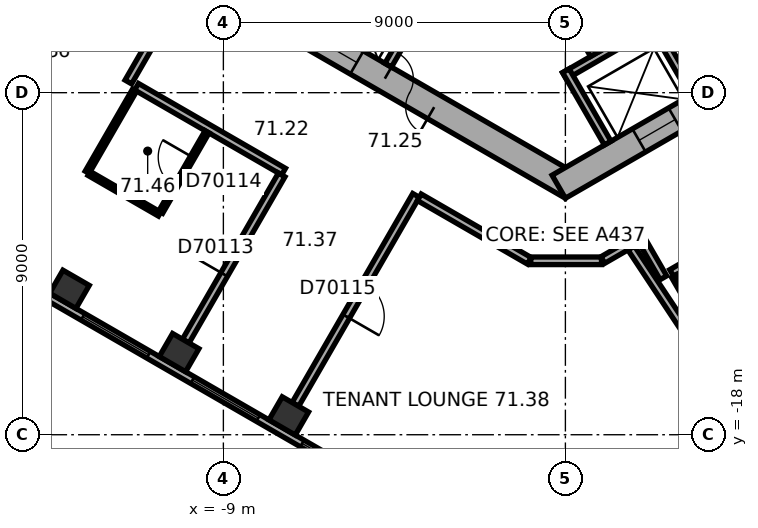
"""IFC4 building model, lengths in metres.
Left out: names, types, materials, properties, quantities, classifications, styles, units other than length and angle.
Written with IfcOpenShell. Run it as: python <this file> out.ifc"""

import sys

from ifc_helpers import new_model, si_unit, direction, frame, frame_2d, origin, origin_2d, place, context, subcontext, project, spatial, rectangle, extrude, element, fill, save


model = new_model("IFC4")
c1 = context("Model", 3, precision=1e-05, world=origin(), true_north=direction((0.0, 1.0)))
c2 = subcontext(c1, "Body", "Model", "MODEL_VIEW")
j1 = project(units=[si_unit("LENGTHUNIT", "METRE"), si_unit("PLANEANGLEUNIT", "RADIAN")], contexts=[c1])
p1 = place(None, origin())
s1 = spatial("IfcSite", under=j1, at=p1, CompositionType="ELEMENT")
p2 = place(p1, origin())
s2 = spatial("IfcBuilding", under=s1, at=p2, CompositionType="ELEMENT")
p3 = place(p2, frame((0.0, 0.0, 289.4)))
s3 = spatial("IfcBuildingStorey", under=s2, at=p3, CompositionType="ELEMENT", Elevation=289.4)
for number, where, z_axis, x_axis in (
    (1, (-13.05, -14.174, 0.0), (0.0, 0.0, 1.0), (0.866, -0.5, 0.0)),
    (2, (-10.165, -15.84, 0.0), (0.0, 0.0, 1.0), (0.866, -0.5, 0.0)),
    (3, (-7.28, -17.505, 0.0), (0.0, 0.0, 1.0), (0.866, -0.5, 0.0)),
):
    element("IfcColumn", number, at=place(p3, frame(where, z_axis=z_axis, x_axis=x_axis)), inside=s3, PredefinedType="COLUMN", context=c2, shape_type="SweptSolid", body=[
        extrude(rectangle(XDim=0.8, YDim=0.7, at=origin_2d()), origin(), (0.0, 0.0, 1.0), 3.7),
    ])
p4 = place(p3, frame((-10.025, -5.586, 0.0), z_axis=(0.0, 0.0, 1.0), x_axis=(0.866026453023, -0.499998182661, 0.0)))
e4 = element("IfcWall", 4, at=p4, inside=s3, PredefinedType="SHEAR", context=c2, shape_type="SweptSolid", body=[
    extrude(rectangle(XDim=11.778, YDim=0.7, at=frame_2d((5.889, 0.0))), origin(), (0.0, 0.0, 1.0), 3.7),
])
p5 = place(p4, frame((6.089, 0.0, 0.0)))
e5 = element("IfcOpeningElement", 5, at=p5, cuts=e4, PredefinedType="OPENING", context=c2, shape_type="SweptSolid", body=[
    extrude(rectangle(XDim=1.5, YDim=2.1, at=frame_2d((0.75, 1.05))), frame((0.0, 0.36, 0.0), z_axis=(0.0, -1.0, 0.0), x_axis=(1.0, 0.0, 0.0)), (0.0, 0.0, 1.0), 0.72),
])
p6 = place(p4, frame((1.539, 0.0, 0.0)))
e6 = element("IfcOpeningElement", 6, at=p6, cuts=e4, PredefinedType="OPENING", context=c2, shape_type="SweptSolid", body=[
    extrude(rectangle(XDim=1.1, YDim=2.1, at=frame_2d((0.55, 1.05))), frame((0.0, 0.36, 0.0), z_axis=(0.0, -1.0, 0.0), x_axis=(1.0, 0.0, 0.0)), (0.0, 0.0, 1.0), 0.72),
])
p7 = place(p4, frame((4.139, 0.0, 0.0)))
e7 = element("IfcOpeningElement", 7, at=p7, cuts=e4, PredefinedType="OPENING", context=c2, shape_type="SweptSolid", body=[
    extrude(rectangle(XDim=1.1, YDim=2.1, at=frame_2d((0.55, 1.05))), frame((0.0, 0.36, 0.0), z_axis=(0.0, -1.0, 0.0), x_axis=(1.0, 0.0, 0.0)), (0.0, 0.0, 1.0), 0.72),
])
p8 = place(p3, frame((-0.175, -11.475, 0.0), z_axis=(0.0, 0.0, 1.0), x_axis=(0.866026453023, 0.499998182661, 0.0)))
e8 = element("IfcWall", 8, at=p8, inside=s3, PredefinedType="SHEAR", context=c2, shape_type="SweptSolid", body=[
    extrude(rectangle(XDim=11.778, YDim=0.7, at=frame_2d((5.889, 0.0))), origin(), (0.0, 0.0, 1.0), 3.7),
])
p9 = place(p8, frame((2.439, 0.0, 0.0)))
e9 = element("IfcOpeningElement", 9, at=p9, cuts=e8, PredefinedType="OPENING", context=c2, shape_type="SweptSolid", body=[
    extrude(rectangle(XDim=1.1, YDim=2.1, at=frame_2d((0.55, 1.05))), frame((0.0, 0.36, 0.0), z_axis=(0.0, -1.0, 0.0), x_axis=(1.0, 0.0, 0.0)), (0.0, 0.0, 1.0), 0.72),
])
p10 = place(p8, frame((5.039, 0.0, 0.0)))
e10 = element("IfcOpeningElement", 10, at=p10, cuts=e8, PredefinedType="OPENING", context=c2, shape_type="SweptSolid", body=[
    extrude(rectangle(XDim=1.1, YDim=2.1, at=frame_2d((0.55, 1.05))), frame((0.0, 0.36, 0.0), z_axis=(0.0, -1.0, 0.0), x_axis=(1.0, 0.0, 0.0)), (0.0, 0.0, 1.0), 0.72),
])
p11 = place(p8, frame((7.639, 0.0, 0.0)))
e11 = element("IfcOpeningElement", 11, at=p11, cuts=e8, PredefinedType="OPENING", context=c2, shape_type="SweptSolid", body=[
    extrude(rectangle(XDim=1.1, YDim=2.1, at=frame_2d((0.55, 1.05))), frame((0.0, 0.36, 0.0), z_axis=(0.0, -1.0, 0.0), x_axis=(1.0, 0.0, 0.0)), (0.0, 0.0, 1.0), 0.72),
])
p12 = place(p3, frame((-16.626, -12.629, 0.0), z_axis=(0.0, 0.0, 1.0), x_axis=(0.866026460444, -0.499998169808, 0.0)))
e12 = element("IfcWall", 12, at=p12, inside=s3, PredefinedType="STANDARD", context=c2, shape_type="SweptSolid", body=[
    extrude(rectangle(XDim=17.731, YDim=0.2, at=frame_2d((8.866, 0.0))), origin(), (0.0, 0.0, 1.0), 3.7),
])
p13 = place(p12, frame((1.203, 0.0, 0.9)))
e13 = element("IfcOpeningElement", 13, at=p13, cuts=e12, PredefinedType="OPENING", context=c2, shape_type="SweptSolid", body=[
    extrude(rectangle(XDim=2.0, YDim=2.0, at=frame_2d((1.0, 1.0))), frame((0.0, 0.11, 0.0), z_axis=(0.0, -1.0, 0.0), x_axis=(1.0, 0.0, 0.0)), (0.0, 0.0, 1.0), 0.22),
])
p14 = place(p12, frame((4.535, 0.0, 0.9)))
e14 = element("IfcOpeningElement", 14, at=p14, cuts=e12, PredefinedType="OPENING", context=c2, shape_type="SweptSolid", body=[
    extrude(rectangle(XDim=2.0, YDim=2.0, at=frame_2d((1.0, 1.0))), frame((0.0, 0.11, 0.0), z_axis=(0.0, -1.0, 0.0), x_axis=(1.0, 0.0, 0.0)), (0.0, 0.0, 1.0), 0.22),
])
p15 = place(p12, frame((7.867, 0.0, 0.9)))
e15 = element("IfcOpeningElement", 15, at=p15, cuts=e12, PredefinedType="OPENING", context=c2, shape_type="SweptSolid", body=[
    extrude(rectangle(XDim=2.0, YDim=2.0, at=frame_2d((1.0, 1.0))), frame((0.0, 0.11, 0.0), z_axis=(0.0, -1.0, 0.0), x_axis=(1.0, 0.0, 0.0)), (0.0, 0.0, 1.0), 0.22),
])
p16 = place(p12, frame((11.198, 0.0, 0.9)))
e16 = element("IfcOpeningElement", 16, at=p16, cuts=e12, PredefinedType="OPENING", context=c2, shape_type="SweptSolid", body=[
    extrude(rectangle(XDim=2.0, YDim=2.0, at=frame_2d((1.0, 1.0))), frame((0.0, 0.11, 0.0), z_axis=(0.0, -1.0, 0.0), x_axis=(1.0, 0.0, 0.0)), (0.0, 0.0, 1.0), 0.22),
])
p17 = place(p12, frame((14.53, 0.0, 0.9)))
e17 = element("IfcOpeningElement", 17, at=p17, cuts=e12, PredefinedType="OPENING", context=c2, shape_type="SweptSolid", body=[
    extrude(rectangle(XDim=2.0, YDim=2.0, at=frame_2d((1.0, 1.0))), frame((0.0, 0.11, 0.0), z_axis=(0.0, -1.0, 0.0), x_axis=(1.0, 0.0, 0.0)), (0.0, 0.0, 1.0), 0.22),
])
p18 = place(p3, frame((2.58, -21.377, 0.0), z_axis=(0.0, 0.0, 1.0), x_axis=(0.833888592176, 0.551932800112, 0.0)))
e18 = element("IfcWall", 18, at=p18, inside=s3, PredefinedType="STANDARD", context=c2, shape_type="SweptSolid", body=[
    extrude(rectangle(XDim=17.731, YDim=0.2, at=frame_2d((8.866, 0.0))), origin(), (0.0, 0.0, 1.0), 3.7),
])
p19 = place(p18, frame((1.202, 0.0, 0.9)))
e19 = element("IfcOpeningElement", 19, at=p19, cuts=e18, PredefinedType="OPENING", context=c2, shape_type="SweptSolid", body=[
    extrude(rectangle(XDim=2.0, YDim=2.0, at=frame_2d((1.0, 1.0))), frame((0.0, 0.11, 0.0), z_axis=(0.0, -1.0, 0.0), x_axis=(1.0, 0.0, 0.0)), (0.0, 0.0, 1.0), 0.22),
])
p20 = place(p18, frame((4.533, 0.0, 0.9)))
e20 = element("IfcOpeningElement", 20, at=p20, cuts=e18, PredefinedType="OPENING", context=c2, shape_type="SweptSolid", body=[
    extrude(rectangle(XDim=2.0, YDim=2.0, at=frame_2d((1.0, 1.0))), frame((0.0, 0.11, 0.0), z_axis=(0.0, -1.0, 0.0), x_axis=(1.0, 0.0, 0.0)), (0.0, 0.0, 1.0), 0.22),
])
p21 = place(p18, frame((7.865, 0.0, 0.9)))
e21 = element("IfcOpeningElement", 21, at=p21, cuts=e18, PredefinedType="OPENING", context=c2, shape_type="SweptSolid", body=[
    extrude(rectangle(XDim=2.0, YDim=2.0, at=frame_2d((1.0, 1.0))), frame((0.0, 0.11, 0.0), z_axis=(0.0, -1.0, 0.0), x_axis=(1.0, 0.0, 0.0)), (0.0, 0.0, 1.0), 0.22),
])
p22 = place(p18, frame((11.197, 0.0, 0.9)))
e22 = element("IfcOpeningElement", 22, at=p22, cuts=e18, PredefinedType="OPENING", context=c2, shape_type="SweptSolid", body=[
    extrude(rectangle(XDim=2.0, YDim=2.0, at=frame_2d((1.0, 1.0))), frame((0.0, 0.11, 0.0), z_axis=(0.0, -1.0, 0.0), x_axis=(1.0, 0.0, 0.0)), (0.0, 0.0, 1.0), 0.22),
])
p23 = place(p18, frame((14.528, 0.0, 0.9)))
e23 = element("IfcOpeningElement", 23, at=p23, cuts=e18, PredefinedType="OPENING", context=c2, shape_type="SweptSolid", body=[
    extrude(rectangle(XDim=2.0, YDim=2.0, at=frame_2d((1.0, 1.0))), frame((0.0, 0.11, 0.0), z_axis=(0.0, -1.0, 0.0), x_axis=(1.0, 0.0, 0.0)), (0.0, 0.0, 1.0), 0.22),
])
p24 = place(p3, frame((-3.563, -6.372, 0.0), z_axis=(0.0, 0.0, 1.0), x_axis=(-0.499994660107, -0.866028486751, 0.0)))
e24 = element("IfcWall", 24, at=p24, inside=s3, PredefinedType="PARTITIONING", context=c2, shape_type="SweptSolid", body=[
    extrude(rectangle(XDim=2.2, YDim=0.2, at=frame_2d((1.1, 0.0))), origin(), (0.0, 0.0, 1.0), 3.42),
])
p25 = place(p3, frame((-0.024, -8.559, 0.0), z_axis=(0.0, 0.0, 1.0), x_axis=(0.866026010844, 0.49999894854, 0.0)))
e25 = element("IfcWall", 25, at=p25, inside=s3, PredefinedType="PARTITIONING", context=c2, shape_type="SweptSolid", body=[
    extrude(rectangle(XDim=8.0, YDim=0.2, at=frame_2d((4.0, 0.0))), origin(), (0.0, 0.0, 1.0), 3.42),
])
for number, where, z_axis, x_axis in (
    (26, (0.013, -8.422, 0.0), (0.0, 0.0, 1.0), (0.5, -0.866, 0.0)),
    (27, (2.264, -7.122, 0.0), (0.0, 0.0, 1.0), (0.5, -0.866, 0.0)),
):
    element("IfcWall", number, at=place(p3, frame(where, z_axis=z_axis, x_axis=x_axis)), inside=s3, PredefinedType="PARTITIONING", context=c2, shape_type="SweptSolid", body=[
        extrude(rectangle(XDim=2.2, YDim=0.2, at=frame_2d((1.1, 0.0))), origin(), (0.0, 0.0, 1.0), 3.42),
    ])
p26 = place(p3, frame((-1.558, -3.902, 0.0), z_axis=(0.0, 0.0, 1.0), x_axis=(0.499977259774, -0.866038532462, 0.0)))
e28 = element("IfcWall", 28, at=p26, inside=s3, PredefinedType="SHEAR", context=c2, shape_type="SweptSolid", body=[
    extrude(rectangle(XDim=4.7, YDim=0.3, at=frame_2d((2.35, 0.0))), origin(), (0.0, 0.0, 1.0), 3.42),
])
p27 = place(p26, frame((0.8, 0.0, 0.0)))
e29 = element("IfcOpeningElement", 29, at=p27, cuts=e28, PredefinedType="OPENING", context=c2, shape_type="SweptSolid", body=[
    extrude(rectangle(XDim=1.2, YDim=2.1, at=frame_2d((0.6, 1.05))), frame((0.0, 0.16, 0.0), z_axis=(0.0, -1.0, 0.0), x_axis=(1.0, 0.0, 0.0)), (0.0, 0.0, 1.0), 0.32),
])
p28 = place(p3, frame((-12.585, -11.095, 0.0), z_axis=(0.0, 0.0, 1.0), x_axis=(0.500004234368, 0.866022959057, 0.0)))
e30 = element("IfcWall", 30, at=p28, inside=s3, PredefinedType="PARTITIONING", context=c2, shape_type="SweptSolid", body=[
    extrude(rectangle(XDim=2.5, YDim=0.12, at=frame_2d((1.25, 0.0))), origin(), (0.0, 0.0, 1.0), 3.42),
])
p29 = place(p3, frame((-11.285, -8.844, 0.0), z_axis=(0.0, 0.0, 1.0), x_axis=(0.866021785011, -0.500006267848, 0.0)))
e31 = element("IfcWall", 31, at=p29, inside=s3, PredefinedType="PARTITIONING", context=c2, shape_type="SweptSolid", body=[
    extrude(rectangle(XDim=4.468, YDim=0.2, at=frame_2d((2.234, 0.0))), origin(), (0.0, 0.0, 1.0), 3.42),
])
p30 = place(p3, frame((-10.901, -7.678, 0.0), z_axis=(0.0, 0.0, 1.0), x_axis=(-0.500074377092, -0.865982457891, 0.0)))
e32 = element("IfcWall", 32, at=p30, inside=s3, PredefinedType="PARTITIONING", context=c2, shape_type="SweptSolid", body=[
    extrude(rectangle(XDim=1.201, YDim=0.2, at=frame_2d((0.601, 0.0))), origin(), (0.0, 0.0, 1.0), 3.42),
])
p31 = place(p3, frame((-10.679, -12.195, 0.0), z_axis=(0.0, 0.0, 1.0), x_axis=(-0.866037418504, 0.499979189318, 0.0)))
e33 = element("IfcWall", 33, at=p31, inside=s3, PredefinedType="PARTITIONING", context=c2, shape_type="SweptSolid", body=[
    extrude(rectangle(XDim=2.14, YDim=0.12, at=frame_2d((1.07, 0.0))), origin(), (0.0, 0.0, 1.0), 3.42),
])
p32 = place(p3, frame((-9.99, -15.537, 0.0), z_axis=(0.0, 0.0, 1.0), x_axis=(0.499966611936, 0.866044679534, 0.0)))
e34 = element("IfcWall", 34, at=p32, inside=s3, PredefinedType="PARTITIONING", context=c2, shape_type="SweptSolid", body=[
    extrude(rectangle(XDim=5.049, YDim=0.2, at=frame_2d((2.524, 0.0))), origin(), (0.0, 0.0, 1.0), 2.87),
])
p33 = place(p32, frame((2.024, 0.0, 0.0)))
e35 = element("IfcOpeningElement", 35, at=p33, cuts=e34, PredefinedType="OPENING", context=c2, shape_type="SweptSolid", body=[
    extrude(rectangle(XDim=1.0, YDim=2.1, at=frame_2d((0.5, 1.05))), frame((0.0, 0.11, 0.0), z_axis=(0.0, -1.0, 0.0), x_axis=(1.0, 0.0, 0.0)), (0.0, 0.0, 1.0), 0.22),
])
p34 = place(p3, frame((-9.429, -10.03, 0.0), z_axis=(0.0, 0.0, 1.0), x_axis=(-0.500034220881, -0.866005645448, 0.0)))
e36 = element("IfcWall", 36, at=p34, inside=s3, PredefinedType="PARTITIONING", context=c2, shape_type="SweptSolid", body=[
    extrude(rectangle(XDim=2.44, YDim=0.12, at=frame_2d((1.22, 0.0))), origin(), (0.0, 0.0, 1.0), 3.42),
])
p35 = place(p34, frame((0.77, 0.0, 0.0)))
e37 = element("IfcOpeningElement", 37, at=p35, cuts=e36, PredefinedType="OPENING", context=c2, shape_type="SweptSolid", body=[
    extrude(rectangle(XDim=0.9, YDim=2.1, at=frame_2d((0.45, 1.05))), frame((0.0, 0.07, 0.0), z_axis=(0.0, -1.0, 0.0), x_axis=(1.0, 0.0, 0.0)), (0.0, 0.0, 1.0), 0.14),
])
p36 = place(p3, frame((-7.105, -17.202, 0.0), z_axis=(0.0, 0.0, 1.0), x_axis=(0.499988692146, 0.866031932279, 0.0)))
e38 = element("IfcWall", 38, at=p36, inside=s3, PredefinedType="PARTITIONING", context=c2, shape_type="SweptSolid", body=[
    extrude(rectangle(XDim=6.35, YDim=0.2, at=frame_2d((3.175, 0.0))), origin(), (0.0, 0.0, 1.0), 3.42),
])
p37 = place(p36, frame((2.675, 0.0, 0.0)))
e39 = element("IfcOpeningElement", 39, at=p37, cuts=e38, PredefinedType="OPENING", context=c2, shape_type="SweptSolid", body=[
    extrude(rectangle(XDim=1.0, YDim=2.1, at=frame_2d((0.5, 1.05))), frame((0.0, 0.11, 0.0), z_axis=(0.0, -1.0, 0.0), x_axis=(1.0, 0.0, 0.0)), (0.0, 0.0, 1.0), 0.22),
])
p38 = place(p3, frame((-3.843, -11.753, 0.0), z_axis=(0.0, 0.0, 1.0), x_axis=(0.866031037473, -0.499990242038, 0.0)))
e40 = element("IfcWall", 40, at=p38, inside=s3, PredefinedType="PARTITIONING", context=c2, shape_type="SweptSolid", body=[
    extrude(rectangle(XDim=3.341, YDim=0.2, at=frame_2d((1.67, 0.0))), origin(), (0.0, 0.0, 1.0), 3.42),
])
p39 = place(p3, frame((-0.91, -13.423, 0.0), z_axis=(0.0, 0.0, 1.0), x_axis=(1.0, 0.0, 0.0)))
e41 = element("IfcWall", 41, at=p39, inside=s3, PredefinedType="PARTITIONING", context=c2, shape_type="SweptSolid", body=[
    extrude(rectangle(XDim=1.86, YDim=0.2, at=frame_2d((0.93, 0.0))), origin(), (0.0, 0.0, 1.0), 3.42),
])
p40 = place(p3, frame((0.985, -13.403, 0.0), z_axis=(0.0, 0.0, 1.0), x_axis=(0.866032814021, 0.499987164874, 0.0)))
e42 = element("IfcWall", 42, at=p40, inside=s3, PredefinedType="PARTITIONING", context=c2, shape_type="SweptSolid", body=[
    extrude(rectangle(XDim=0.798, YDim=0.2, at=frame_2d((0.399, 0.0))), origin(), (0.0, 0.0, 1.0), 3.42),
])
p41 = place(p3, frame((1.979, -12.829, 0.0), z_axis=(0.0, 0.0, 1.0), x_axis=(0.500074377092, -0.865982457891, 0.0)))
e43 = element("IfcWall", 43, at=p41, inside=s3, PredefinedType="PARTITIONING", context=c2, shape_type="SweptSolid", body=[
    extrude(rectangle(XDim=1.201, YDim=0.2, at=frame_2d((0.601, 0.0))), origin(), (0.0, 0.0, 1.0), 3.42),
])
p42 = place(p3, frame((2.796, -13.744, 0.0), z_axis=(0.0, 0.0, 1.0), x_axis=(0.866034573852, 0.49998411664, 0.0)))
e44 = element("IfcWall", 44, at=p42, inside=s3, PredefinedType="PARTITIONING", context=c2, shape_type="SweptSolid", body=[
    extrude(rectangle(XDim=2.8, YDim=0.2, at=frame_2d((1.4, 0.0))), origin(), (0.0, 0.0, 1.0), 3.42),
])
p43 = place(p3, frame((4.396, -16.516, 0.0), z_axis=(0.0, 0.0, 1.0), x_axis=(-0.49999285859, 0.86602952684, 0.0)))
e45 = element("IfcWall", 45, at=p43, inside=s3, PredefinedType="PARTITIONING", context=c2, shape_type="SweptSolid", body=[
    extrude(rectangle(XDim=3.1, YDim=0.12, at=frame_2d((1.55, 0.0))), origin(), (0.0, 0.0, 1.0), 3.42),
])
p44 = place(p3, frame((5.364, -18.575, 0.0), z_axis=(0.0, 0.0, 1.0), x_axis=(-0.55195757761, 0.833872191957, 0.0)))
e46 = element("IfcWall", 46, at=p44, inside=s3, PredefinedType="PARTITIONING", context=c2, shape_type="SweptSolid", body=[
    extrude(rectangle(XDim=6.581, YDim=0.2, at=frame_2d((3.291, 0.0))), origin(), (0.0, 0.0, 1.0), 3.42),
])
p45 = place(p14, origin())
e47 = element("IfcWindow", 47, at=p45, inside=s3, PartitioningType="SINGLE_PANEL", PredefinedType="WINDOW", context=c2, shape_type="SweptSolid", body=[
    extrude(rectangle(XDim=2.0, YDim=2.0, at=frame_2d((1.0, 1.0))), frame((0.0, 0.03, 0.0), z_axis=(0.0, -1.0, 0.0), x_axis=(1.0, 0.0, 0.0)), (0.0, 0.0, 1.0), 0.06),
])
fill(e14, e47)
p46 = place(p15, origin())
e48 = element("IfcWindow", 48, at=p46, inside=s3, PartitioningType="SINGLE_PANEL", PredefinedType="WINDOW", context=c2, shape_type="SweptSolid", body=[
    extrude(rectangle(XDim=2.0, YDim=2.0, at=frame_2d((1.0, 1.0))), frame((0.0, 0.03, 0.0), z_axis=(0.0, -1.0, 0.0), x_axis=(1.0, 0.0, 0.0)), (0.0, 0.0, 1.0), 0.06),
])
fill(e15, e48)
p47 = place(p16, origin())
e49 = element("IfcWindow", 49, at=p47, inside=s3, PartitioningType="SINGLE_PANEL", PredefinedType="WINDOW", context=c2, shape_type="SweptSolid", body=[
    extrude(rectangle(XDim=2.0, YDim=2.0, at=frame_2d((1.0, 1.0))), frame((0.0, 0.03, 0.0), z_axis=(0.0, -1.0, 0.0), x_axis=(1.0, 0.0, 0.0)), (0.0, 0.0, 1.0), 0.06),
])
fill(e16, e49)
p48 = place(p5, origin())
e50 = element("IfcDoor", 50, at=p48, inside=s3, OperationType="DOUBLE_DOOR_SINGLE_SWING", PredefinedType="DOOR", context=c2, shape_type="SweptSolid", body=[
    extrude(rectangle(XDim=1.5, YDim=2.1, at=frame_2d((0.75, 1.05))), frame((0.0, 0.025, 0.0), z_axis=(0.0, -1.0, 0.0), x_axis=(1.0, 0.0, 0.0)), (0.0, 0.0, 1.0), 0.05),
])
fill(e5, e50)
p49 = place(p7, origin())
e51 = element("IfcDoor", 51, at=p49, inside=s3, OperationType="DOUBLE_DOOR_SLIDING", PredefinedType="DOOR", context=c2, shape_type="SweptSolid", body=[
    extrude(rectangle(XDim=1.1, YDim=2.1, at=frame_2d((0.55, 1.05))), frame((0.0, 0.025, 0.0), z_axis=(0.0, -1.0, 0.0), x_axis=(1.0, 0.0, 0.0)), (0.0, 0.0, 1.0), 0.05),
])
fill(e7, e51)
p50 = place(p9, origin())
e52 = element("IfcDoor", 52, at=p50, inside=s3, OperationType="DOUBLE_DOOR_SLIDING", PredefinedType="DOOR", context=c2, shape_type="SweptSolid", body=[
    extrude(rectangle(XDim=1.1, YDim=2.1, at=frame_2d((0.55, 1.05))), frame((0.0, 0.025, 0.0), z_axis=(0.0, -1.0, 0.0), x_axis=(1.0, 0.0, 0.0)), (0.0, 0.0, 1.0), 0.05),
])
fill(e9, e52)
p51 = place(p33, origin())
e53 = element("IfcDoor", 53, at=p51, inside=s3, OperationType="SINGLE_SWING_LEFT", PredefinedType="DOOR", context=c2, shape_type="SweptSolid", body=[
    extrude(rectangle(XDim=1.0, YDim=2.1, at=frame_2d((0.5, 1.05))), frame((0.0, 0.025, 0.0), z_axis=(0.0, -1.0, 0.0), x_axis=(1.0, 0.0, 0.0)), (0.0, 0.0, 1.0), 0.05),
])
fill(e35, e53)
p52 = place(p35, origin())
e54 = element("IfcDoor", 54, at=p52, inside=s3, OperationType="SINGLE_SWING_LEFT", PredefinedType="DOOR", context=c2, shape_type="SweptSolid", body=[
    extrude(rectangle(XDim=0.9, YDim=2.1, at=frame_2d((0.45, 1.05))), frame((0.0, 0.025, 0.0), z_axis=(0.0, -1.0, 0.0), x_axis=(1.0, 0.0, 0.0)), (0.0, 0.0, 1.0), 0.05),
])
fill(e37, e54)
p53 = place(p37, origin())
e55 = element("IfcDoor", 55, at=p53, inside=s3, OperationType="SINGLE_SWING_LEFT", PredefinedType="DOOR", context=c2, shape_type="SweptSolid", body=[
    extrude(rectangle(XDim=1.0, YDim=2.1, at=frame_2d((0.5, 1.05))), frame((0.0, 0.025, 0.0), z_axis=(0.0, -1.0, 0.0), x_axis=(1.0, 0.0, 0.0)), (0.0, 0.0, 1.0), 0.05),
])
fill(e39, e55)
save(model, sys.argv[1])
